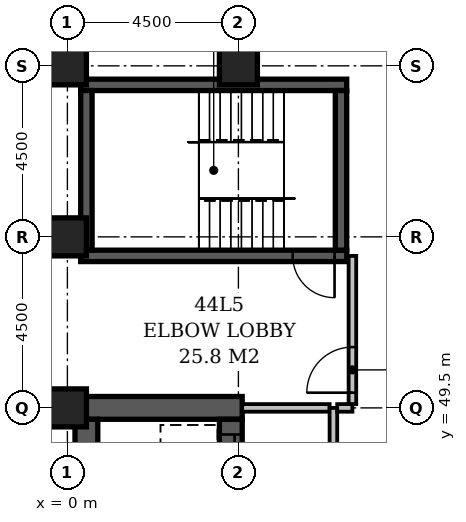
"""IFC4 building model, lengths in metres.
Left out: names, types, materials, properties, quantities, classifications, styles, units other than length and angle.
Written with IfcOpenShell. Run it as: python <this file> out.ifc"""

import sys

from ifc_helpers import new_model, si_unit, direction, frame, frame_2d, origin, origin_2d, place, context, subcontext, project, spatial, rectangle, extrude, element, fill, save


model = new_model("IFC4")
c1 = context("Model", 3, precision=1e-05, world=origin(), true_north=direction((0.0, 1.0)))
c2 = subcontext(c1, "Body", "Model", "MODEL_VIEW")
j1 = project(units=[si_unit("LENGTHUNIT", "METRE"), si_unit("PLANEANGLEUNIT", "RADIAN")], contexts=[c1])
p1 = place(None, origin())
s1 = spatial("IfcSite", under=j1, at=p1, CompositionType="ELEMENT")
p2 = place(p1, origin())
s2 = spatial("IfcBuilding", under=s1, at=p2, CompositionType="ELEMENT")
p3 = place(p2, frame((0.0, 0.0, 173.6)))
s3 = spatial("IfcBuildingStorey", under=s2, at=p3, CompositionType="ELEMENT", Elevation=173.6)
p4 = place(p3, frame((0.2, 49.5, -0.45), z_axis=(0.0, 0.0, 1.0), x_axis=(1.0, 0.0, 0.0)))
e1 = element("IfcWall", 1, at=p4, inside=s3, PredefinedType="SHEAR", context=c2, shape_type="SweptSolid", body=[
    extrude(rectangle(XDim=4.4, YDim=0.6, at=frame_2d((2.2, 0.0))), origin(), (0.0, 0.0, 1.0), 5.55),
])
p5 = place(p3, frame((0.35, 53.5, -0.45), z_axis=(0.0, 0.0, 1.0), x_axis=(1.0, 0.0, 0.0)))
e2 = element("IfcWall", 2, at=p5, inside=s3, PredefinedType="SHEAR", context=c2, shape_type="SweptSolid", body=[
    extrude(rectangle(XDim=7.0, YDim=0.3, at=frame_2d((3.5, 0.0))), origin(), (0.0, 0.0, 1.0), 5.55),
])
p6 = place(p5, frame((5.58, 0.0, 0.45)))
e3 = element("IfcOpeningElement", 3, at=p6, cuts=e2, PredefinedType="OPENING", context=c2, shape_type="SweptSolid", body=[
    extrude(rectangle(XDim=1.1, YDim=2.1, at=frame_2d((0.55, 1.05))), frame((0.0, 0.162, 0.0), z_axis=(0.0, -1.0, 0.0), x_axis=(1.0, 0.0, 0.0)), (0.0, 0.0, 1.0), 0.324),
])
p7 = place(p3, frame((0.35, 58.0, -0.45), z_axis=(0.0, 0.0, 1.0), x_axis=(1.0, 0.0, 0.0)))
e4 = element("IfcWall", 4, at=p7, inside=s3, PredefinedType="SHEAR", context=c2, shape_type="SweptSolid", body=[
    extrude(rectangle(XDim=7.0, YDim=0.3, at=frame_2d((3.5, 0.0))), origin(), (0.0, 0.0, 1.0), 5.55),
])
p8 = place(p3, frame((0.5, 27.15, -0.45), z_axis=(0.0, 0.0, 1.0), x_axis=(0.0, 1.0, 0.0)))
e5 = element("IfcWall", 5, at=p8, inside=s3, PredefinedType="SHEAR", context=c2, shape_type="SweptSolid", body=[
    extrude(rectangle(XDim=22.05, YDim=0.6, at=frame_2d((11.025, 0.0))), origin(), (0.0, 0.0, 1.0), 5.55),
])
p9 = place(p3, frame((0.5, 53.65, -0.45), z_axis=(0.0, 0.0, 1.0), x_axis=(0.0, 1.0, 0.0)))
e6 = element("IfcWall", 6, at=p9, inside=s3, PredefinedType="SHEAR", context=c2, shape_type="SweptSolid", body=[
    extrude(rectangle(XDim=4.2, YDim=0.3, at=frame_2d((2.1, 0.0))), origin(), (0.0, 0.0, 1.0), 5.55),
])
p10 = place(p3, frame((4.3, 27.15, -0.45), z_axis=(0.0, 0.0, 1.0), x_axis=(0.0, 1.0, 0.0)))
e7 = element("IfcWall", 7, at=p10, inside=s3, PredefinedType="SHEAR", context=c2, shape_type="SweptSolid", body=[
    extrude(rectangle(XDim=22.05, YDim=0.6, at=frame_2d((11.025, 0.0))), origin(), (0.0, 0.0, 1.0), 5.55),
])
p11 = place(p10, frame((3.05, 0.0, 0.45)))
e8 = element("IfcOpeningElement", 8, at=p11, cuts=e7, PredefinedType="OPENING", context=c2, shape_type="SweptSolid", body=[
    extrude(rectangle(XDim=1.1, YDim=2.1, at=frame_2d((0.55, 1.05))), frame((0.0, 0.312, 0.0), z_axis=(0.0, -1.0, 0.0), x_axis=(1.0, 0.0, 0.0)), (0.0, 0.0, 1.0), 0.624),
])
p12 = place(p10, frame((0.55, 0.0, 0.45)))
e9 = element("IfcOpeningElement", 9, at=p12, cuts=e7, PredefinedType="OPENING", context=c2, shape_type="SweptSolid", body=[
    extrude(rectangle(XDim=1.1, YDim=2.1, at=frame_2d((0.55, 1.05))), frame((0.0, 0.312, 0.0), z_axis=(0.0, -1.0, 0.0), x_axis=(1.0, 0.0, 0.0)), (0.0, 0.0, 1.0), 0.624),
])
p13 = place(p10, frame((20.55, 0.0, 0.45)))
e10 = element("IfcOpeningElement", 10, at=p13, cuts=e7, PredefinedType="OPENING", context=c2, shape_type="SweptSolid", body=[
    extrude(rectangle(XDim=1.1, YDim=2.1, at=frame_2d((0.55, 1.05))), frame((0.0, 0.312, 0.0), z_axis=(0.0, -1.0, 0.0), x_axis=(1.0, 0.0, 0.0)), (0.0, 0.0, 1.0), 0.624),
])
p14 = place(p10, frame((18.05, 0.0, 0.45)))
e11 = element("IfcOpeningElement", 11, at=p14, cuts=e7, PredefinedType="OPENING", context=c2, shape_type="SweptSolid", body=[
    extrude(rectangle(XDim=1.1, YDim=2.1, at=frame_2d((0.55, 1.05))), frame((0.0, 0.312, 0.0), z_axis=(0.0, -1.0, 0.0), x_axis=(1.0, 0.0, 0.0)), (0.0, 0.0, 1.0), 0.624),
])
p15 = place(p10, frame((15.55, 0.0, 0.45)))
e12 = element("IfcOpeningElement", 12, at=p15, cuts=e7, PredefinedType="OPENING", context=c2, shape_type="SweptSolid", body=[
    extrude(rectangle(XDim=1.1, YDim=2.1, at=frame_2d((0.55, 1.05))), frame((0.0, 0.312, 0.0), z_axis=(0.0, -1.0, 0.0), x_axis=(1.0, 0.0, 0.0)), (0.0, 0.0, 1.0), 0.624),
])
p16 = place(p10, frame((13.05, 0.0, 0.45)))
e13 = element("IfcOpeningElement", 13, at=p16, cuts=e7, PredefinedType="OPENING", context=c2, shape_type="SweptSolid", body=[
    extrude(rectangle(XDim=1.1, YDim=2.1, at=frame_2d((0.55, 1.05))), frame((0.0, 0.312, 0.0), z_axis=(0.0, -1.0, 0.0), x_axis=(1.0, 0.0, 0.0)), (0.0, 0.0, 1.0), 0.624),
])
p17 = place(p10, frame((10.55, 0.0, 0.45)))
e14 = element("IfcOpeningElement", 14, at=p17, cuts=e7, PredefinedType="OPENING", context=c2, shape_type="SweptSolid", body=[
    extrude(rectangle(XDim=1.1, YDim=2.1, at=frame_2d((0.55, 1.05))), frame((0.0, 0.312, 0.0), z_axis=(0.0, -1.0, 0.0), x_axis=(1.0, 0.0, 0.0)), (0.0, 0.0, 1.0), 0.624),
])
p18 = place(p10, frame((8.05, 0.0, 0.45)))
e15 = element("IfcOpeningElement", 15, at=p18, cuts=e7, PredefinedType="OPENING", context=c2, shape_type="SweptSolid", body=[
    extrude(rectangle(XDim=1.1, YDim=2.1, at=frame_2d((0.55, 1.05))), frame((0.0, 0.312, 0.0), z_axis=(0.0, -1.0, 0.0), x_axis=(1.0, 0.0, 0.0)), (0.0, 0.0, 1.0), 0.624),
])
p19 = place(p10, frame((5.55, 0.0, 0.45)))
e16 = element("IfcOpeningElement", 16, at=p19, cuts=e7, PredefinedType="OPENING", context=c2, shape_type="SweptSolid", body=[
    extrude(rectangle(XDim=1.1, YDim=2.1, at=frame_2d((0.55, 1.05))), frame((0.0, 0.312, 0.0), z_axis=(0.0, -1.0, 0.0), x_axis=(1.0, 0.0, 0.0)), (0.0, 0.0, 1.0), 0.624),
])
p20 = place(p3, frame((7.2, 53.65, -0.45), z_axis=(0.0, 0.0, 1.0), x_axis=(0.0, 1.0, 0.0)))
e17 = element("IfcWall", 17, at=p20, inside=s3, PredefinedType="SHEAR", context=c2, shape_type="SweptSolid", body=[
    extrude(rectangle(XDim=4.2, YDim=0.3, at=frame_2d((2.1, 0.0))), origin(), (0.0, 0.0, 1.0), 5.55),
])
for number, where, z_axis, x_axis in (
    (18, (0.0, 49.5, -0.45), (0.0, 0.0, 1.0), (1.0, 0.0, 0.0)),
    (19, (0.0, 54.0, -0.45), (0.0, 0.0, 1.0), (1.0, 0.0, 0.0)),
    (20, (0.0, 58.5, -0.45), (0.0, 0.0, 1.0), (1.0, 0.0, 0.0)),
    (21, (4.5, 58.5, -0.45), (0.0, 0.0, 1.0), (1.0, 0.0, 0.0)),
):
    element("IfcColumn", number, at=place(p3, frame(where, z_axis=z_axis, x_axis=x_axis)), inside=s3, PredefinedType="COLUMN", context=c2, shape_type="SweptSolid", body=[
        extrude(rectangle(XDim=1.0, YDim=1.0, at=origin_2d()), origin(), (0.0, 0.0, 1.0), 5.55),
    ])
p21 = place(p3, frame((7.0, 34.6, 0.0), z_axis=(0.0, 0.0, 1.0), x_axis=(0.0, 1.0, 0.0)))
e22 = element("IfcWall", 22, at=p21, inside=s3, PredefinedType="PARTITIONING", context=c2, shape_type="SweptSolid", body=[
    extrude(rectangle(XDim=14.9, YDim=0.2, at=frame_2d((7.45, 0.0))), origin(), (0.0, 0.0, 1.0), 5.1),
])
p22 = place(p21, frame((2.8, 0.0, 0.0)))
e23 = element("IfcOpeningElement", 23, at=p22, cuts=e22, PredefinedType="OPENING", context=c2, shape_type="SweptSolid", body=[
    extrude(rectangle(XDim=1.2, YDim=2.1, at=frame_2d((0.6, 1.05))), frame((0.0, 0.112, 0.0), z_axis=(0.0, -1.0, 0.0), x_axis=(1.0, 0.0, 0.0)), (0.0, 0.0, 1.0), 0.224),
])
p23 = place(p21, frame((9.8, 0.0, 0.0)))
e24 = element("IfcOpeningElement", 24, at=p23, cuts=e22, PredefinedType="OPENING", context=c2, shape_type="SweptSolid", body=[
    extrude(rectangle(XDim=1.2, YDim=2.1, at=frame_2d((0.6, 1.05))), frame((0.0, 0.112, 0.0), z_axis=(0.0, -1.0, 0.0), x_axis=(1.0, 0.0, 0.0)), (0.0, 0.0, 1.0), 0.224),
])
p24 = place(p3, frame((4.6, 49.5, 0.0), z_axis=(0.0, 0.0, 1.0), x_axis=(1.0, 0.0, 0.0)))
e25 = element("IfcWall", 25, at=p24, inside=s3, PredefinedType="PARTITIONING", context=c2, shape_type="SweptSolid", body=[
    extrude(rectangle(XDim=2.3, YDim=0.2, at=frame_2d((1.15, 0.0))), origin(), (0.0, 0.0, 1.0), 5.1),
])
p25 = place(p3, frame((7.1, 49.5, 0.0), z_axis=(0.0, 0.0, 1.0), x_axis=(1.0, 0.0, 0.0)))
e26 = element("IfcWall", 26, at=p25, inside=s3, PredefinedType="PARTITIONING", context=c2, shape_type="SweptSolid", body=[
    extrude(rectangle(XDim=0.4, YDim=0.2, at=frame_2d((0.2, 0.0))), origin(), (0.0, 0.0, 1.0), 5.1),
])
p26 = place(p3, frame((7.5, 49.6, 0.0), z_axis=(0.0, 0.0, 1.0), x_axis=(0.0, 1.0, 0.0)))
e27 = element("IfcWall", 27, at=p26, inside=s3, PredefinedType="PARTITIONING", context=c2, shape_type="SweptSolid", body=[
    extrude(rectangle(XDim=3.9, YDim=0.2, at=frame_2d((1.95, 0.0))), origin(), (0.0, 0.0, 1.0), 5.1),
])
p27 = place(p26, frame((0.3, 0.0, 0.0)))
e28 = element("IfcOpeningElement", 28, at=p27, cuts=e27, PredefinedType="OPENING", context=c2, shape_type="SweptSolid", body=[
    extrude(rectangle(XDim=1.2, YDim=2.1, at=frame_2d((0.6, 1.05))), frame((0.0, 0.112, 0.0), z_axis=(0.0, -1.0, 0.0), x_axis=(1.0, 0.0, 0.0)), (0.0, 0.0, 1.0), 0.224),
])
p28 = place(p27, origin())
e29 = element("IfcDoor", 29, at=p28, inside=s3, OperationType="SINGLE_SWING_LEFT", PredefinedType="DOOR", context=c2, shape_type="SweptSolid", body=[
    extrude(rectangle(XDim=1.2, YDim=2.1, at=frame_2d((0.6, 1.05))), frame((0.0, 0.025, 0.0), z_axis=(0.0, -1.0, 0.0), x_axis=(1.0, 0.0, 0.0)), (0.0, 0.0, 1.0), 0.05),
])
fill(e28, e29)
p29 = place(p13, origin())
e30 = element("IfcDoor", 30, at=p29, inside=s3, OperationType="SLIDING_TO_LEFT", PredefinedType="DOOR", context=c2, shape_type="SweptSolid", body=[
    extrude(rectangle(XDim=1.1, YDim=2.1, at=frame_2d((0.55, 1.05))), frame((0.0, 0.025, 0.0), z_axis=(0.0, -1.0, 0.0), x_axis=(1.0, 0.0, 0.0)), (0.0, 0.0, 1.0), 0.05),
])
fill(e10, e30)
p30 = place(p6, origin())
e31 = element("IfcDoor", 31, at=p30, inside=s3, OperationType="SINGLE_SWING_RIGHT", PredefinedType="DOOR", context=c2, shape_type="SweptSolid", body=[
    extrude(rectangle(XDim=1.1, YDim=2.1, at=frame_2d((0.55, 1.05))), frame((0.0, 0.025, 0.0), z_axis=(0.0, -1.0, 0.0), x_axis=(1.0, 0.0, 0.0)), (0.0, 0.0, 1.0), 0.05),
])
fill(e3, e31)
save(model, sys.argv[1])
